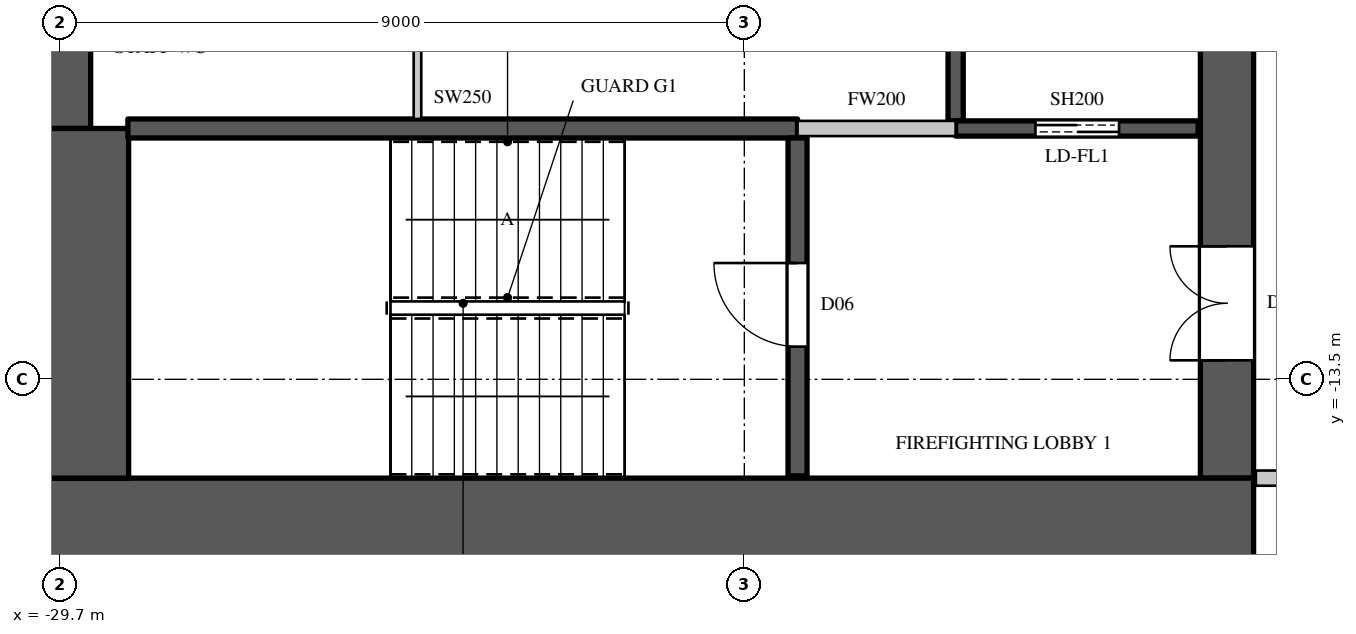
"""IFC4 building model, lengths in metres.
Left out: names, types, materials, properties, quantities, classifications, styles, units other than length and angle.
Written with IfcOpenShell. Run it as: python <this file> out.ifc"""

import sys

from ifc_helpers import new_model, si_unit, direction, frame, frame_2d, origin, place, context, subcontext, project, spatial, rectangle, extrude, element, fill, save


model = new_model("IFC4")
c1 = context("Model", 3, precision=1e-05, world=origin(), true_north=direction((0.0, 1.0)))
c2 = subcontext(c1, "Body", "Model", "MODEL_VIEW")
j1 = project(units=[si_unit("LENGTHUNIT", "METRE"), si_unit("PLANEANGLEUNIT", "RADIAN")], contexts=[c1])
p1 = place(None, origin())
s1 = spatial("IfcSite", under=j1, at=p1, CompositionType="ELEMENT")
p2 = place(p1, origin())
s2 = spatial("IfcBuilding", under=s1, at=p2, CompositionType="ELEMENT")
p3 = place(p2, frame((0.0, 0.0, 268.0)))
s3 = spatial("IfcBuildingStorey", under=s2, at=p3, CompositionType="ELEMENT", Elevation=268.0)
p4 = place(p3, frame((-30.0, -15.4, 0.0), z_axis=(0.0, 0.0, 1.0), x_axis=(1.0, 0.0, 0.0)))
e1 = element("IfcWall", 1, at=p4, inside=s3, PredefinedType="SHEAR", context=c2, shape_type="SweptSolid", body=[
    extrude(rectangle(XDim=16.0, YDim=1.2, at=frame_2d((8.0, 0.0))), origin(), (0.0, 0.0, 1.0), 4.1),
])
p5 = place(p3, frame((-14.35, -14.8, 0.0), z_axis=(0.0, 0.0, 1.0), x_axis=(0.0, 1.0, 0.0)))
e2 = element("IfcWall", 2, at=p5, inside=s3, PredefinedType="SHEAR", context=c2, shape_type="SweptSolid", body=[
    extrude(rectangle(XDim=29.6, YDim=0.7, at=frame_2d((14.8, 0.0))), origin(), (0.0, 0.0, 1.0), 4.1),
])
p6 = place(p5, frame((1.55, 0.0, 0.0)))
e3 = element("IfcOpeningElement", 3, at=p6, cuts=e2, PredefinedType="OPENING", context=c2, shape_type="SweptSolid", body=[
    extrude(rectangle(XDim=1.5, YDim=2.4, at=frame_2d((0.75, 1.2))), frame((0.0, 0.36, 0.0), z_axis=(0.0, -1.0, 0.0), x_axis=(1.0, 0.0, 0.0)), (0.0, 0.0, 1.0), 0.72),
])
p7 = place(p5, frame((26.55, 0.0, 0.0)))
e4 = element("IfcOpeningElement", 4, at=p7, cuts=e2, PredefinedType="OPENING", context=c2, shape_type="SweptSolid", body=[
    extrude(rectangle(XDim=1.5, YDim=2.4, at=frame_2d((0.75, 1.2))), frame((0.0, 0.36, 0.0), z_axis=(0.0, -1.0, 0.0), x_axis=(1.0, 0.0, 0.0)), (0.0, 0.0, 1.0), 0.72),
])
p8 = place(p5, frame((8.45, 0.0, 0.0)))
e5 = element("IfcOpeningElement", 5, at=p8, cuts=e2, PredefinedType="OPENING", context=c2, shape_type="SweptSolid", body=[
    extrude(rectangle(XDim=1.5, YDim=2.4, at=frame_2d((0.75, 1.2))), frame((0.0, 0.36, 0.0), z_axis=(0.0, -1.0, 0.0), x_axis=(1.0, 0.0, 0.0)), (0.0, 0.0, 1.0), 0.72),
])
p9 = place(p5, frame((19.65, 0.0, 0.0)))
e6 = element("IfcOpeningElement", 6, at=p9, cuts=e2, PredefinedType="OPENING", context=c2, shape_type="SweptSolid", body=[
    extrude(rectangle(XDim=1.5, YDim=2.4, at=frame_2d((0.75, 1.2))), frame((0.0, 0.36, 0.0), z_axis=(0.0, -1.0, 0.0), x_axis=(1.0, 0.0, 0.0)), (0.0, 0.0, 1.0), 0.72),
])
p10 = place(p5, frame((14.5, 0.0, 0.0)))
e7 = element("IfcOpeningElement", 7, at=p10, cuts=e2, PredefinedType="OPENING", context=c2, shape_type="SweptSolid", body=[
    extrude(rectangle(XDim=0.6, YDim=2.0, at=frame_2d((0.3, 1.0))), frame((0.0, 0.36, 0.0), z_axis=(0.0, -1.0, 0.0), x_axis=(1.0, 0.0, 0.0)), (0.0, 0.0, 1.0), 0.72),
])
p11 = place(p3, frame((-29.65, -10.2, 0.0), z_axis=(0.0, 0.0, 1.0), x_axis=(0.0, 1.0, 0.0)))
e8 = element("IfcWall", 8, at=p11, inside=s3, PredefinedType="SHEAR", context=c2, shape_type="SweptSolid", body=[
    extrude(rectangle(XDim=20.4, YDim=0.7, at=frame_2d((10.2, 0.0))), origin(), (0.0, 0.0, 1.0), 4.1),
])
p12 = place(p3, frame((-29.4, -14.8, 0.0), z_axis=(0.0, 0.0, 1.0), x_axis=(0.0, 1.0, 0.0)))
e9 = element("IfcWall", 9, at=p12, inside=s3, PredefinedType="SHEAR", context=c2, shape_type="SweptSolid", body=[
    extrude(rectangle(XDim=4.6, YDim=1.2, at=frame_2d((2.3, 0.0))), origin(), (0.0, 0.0, 1.0), 4.1),
])
p13 = place(p3, frame((-20.0, -10.2, 0.0), z_axis=(0.0, 0.0, 1.0), x_axis=(1.0, 0.0, 0.0)))
e10 = element("IfcWall", 10, at=p13, inside=s3, PredefinedType="PARTITIONING", context=c2, shape_type="SweptSolid", body=[
    extrude(rectangle(XDim=2.08, YDim=0.2, at=frame_2d((1.04, 0.0))), origin(), (0.0, 0.0, 1.0), 3.8),
])
p14 = place(p3, frame((-13.97, -14.8, 0.0), z_axis=(0.0, 0.0, 1.0), x_axis=(1.0, 0.0, 0.0)))
e11 = element("IfcWall", 11, at=p14, inside=s3, PredefinedType="PARTITIONING", context=c2, shape_type="SweptSolid", body=[
    extrude(rectangle(XDim=2.87, YDim=0.2, at=frame_2d((1.435, 0.0))), origin(), (0.0, 0.0, 1.0), 3.8),
])
p15 = place(p3, frame((-17.92, -10.1, 0.0), z_axis=(0.0, 0.0, 1.0), x_axis=(0.0, 1.0, 0.0)))
e12 = element("IfcWall", 12, at=p15, inside=s3, PredefinedType="SHEAR", context=c2, shape_type="SweptSolid", body=[
    extrude(rectangle(XDim=2.6, YDim=0.2, at=frame_2d((1.3, 0.0))), origin(), (0.0, 0.0, 1.0), 3.8),
])
p16 = place(p3, frame((-17.92, -10.2, 0.0), z_axis=(0.0, 0.0, 1.0), x_axis=(1.0, 0.0, 0.0)))
e13 = element("IfcWall", 13, at=p16, inside=s3, PredefinedType="SHEAR", context=c2, shape_type="SweptSolid", body=[
    extrude(rectangle(XDim=3.19, YDim=0.2, at=frame_2d((1.595, 0.0))), origin(), (0.0, 0.0, 1.0), 3.8),
])
p17 = place(p16, frame((1.05, 0.0, 0.0)))
e14 = element("IfcOpeningElement", 14, at=p17, cuts=e13, PredefinedType="OPENING", context=c2, shape_type="SweptSolid", body=[
    extrude(rectangle(XDim=1.1, YDim=2.2, at=frame_2d((0.55, 1.1))), frame((0.0, 0.11, 0.0), z_axis=(0.0, -1.0, 0.0), x_axis=(1.0, 0.0, 0.0)), (0.0, 0.0, 1.0), 0.22),
])
p18 = place(p3, frame((-28.81, -10.2, 0.0), z_axis=(0.0, 0.0, 1.0), x_axis=(1.0, 0.0, 0.0)))
e15 = element("IfcWall", 15, at=p18, inside=s3, PredefinedType="SHEAR", context=c2, shape_type="SweptSolid", body=[
    extrude(rectangle(XDim=8.81, YDim=0.25, at=frame_2d((4.405, 0.0))), origin(), (0.0, 0.0, 1.0), 3.8),
])
p19 = place(p3, frame((-20.0, -14.77, 0.0), z_axis=(0.0, 0.0, 1.0), x_axis=(0.0, 1.0, 0.0)))
e16 = element("IfcWall", 16, at=p19, inside=s3, PredefinedType="SHEAR", context=c2, shape_type="SweptSolid", body=[
    extrude(rectangle(XDim=4.445, YDim=0.25, at=frame_2d((2.223, 0.0))), origin(), (0.0, 0.0, 1.0), 3.8),
])
p20 = place(p19, frame((1.7, 0.0, 0.0)))
e17 = element("IfcOpeningElement", 17, at=p20, cuts=e16, PredefinedType="OPENING", context=c2, shape_type="SweptSolid", body=[
    extrude(rectangle(XDim=1.1, YDim=2.2, at=frame_2d((0.55, 1.1))), frame((0.0, 0.135, 0.0), z_axis=(0.0, -1.0, 0.0), x_axis=(1.0, 0.0, 0.0)), (0.0, 0.0, 1.0), 0.27),
])
p21 = place(p3, frame((-25.0, -10.075, 0.0), z_axis=(0.0, 0.0, 1.0), x_axis=(0.0, 1.0, 0.0)))
e18 = element("IfcWall", 18, at=p21, inside=s3, PredefinedType="PARTITIONING", context=c2, shape_type="SweptSolid", body=[
    extrude(rectangle(XDim=2.575, YDim=0.1, at=frame_2d((1.288, 0.0))), origin(), (0.0, 0.0, 1.0), 3.8),
])
p22 = place(p20, origin())
e19 = element("IfcDoor", 19, at=p22, inside=s3, OperationType="SINGLE_SWING_RIGHT", PredefinedType="DOOR", context=c2, shape_type="SweptSolid", body=[
    extrude(rectangle(XDim=1.1, YDim=2.2, at=frame_2d((0.55, 1.1))), frame((0.0, 0.025, 0.0), z_axis=(0.0, -1.0, 0.0), x_axis=(1.0, 0.0, 0.0)), (0.0, 0.0, 1.0), 0.05),
])
fill(e17, e19)
p23 = place(p17, origin())
e20 = element("IfcDoor", 20, at=p23, inside=s3, OperationType="DOUBLE_DOOR_SLIDING", PredefinedType="DOOR", context=c2, shape_type="SweptSolid", body=[
    extrude(rectangle(XDim=1.1, YDim=2.2, at=frame_2d((0.55, 1.1))), frame((0.0, 0.025, 0.0), z_axis=(0.0, -1.0, 0.0), x_axis=(1.0, 0.0, 0.0)), (0.0, 0.0, 1.0), 0.05),
])
fill(e14, e20)
p24 = place(p6, origin())
e21 = element("IfcDoor", 21, at=p24, inside=s3, OperationType="DOUBLE_DOOR_SINGLE_SWING", PredefinedType="DOOR", context=c2, shape_type="SweptSolid", body=[
    extrude(rectangle(XDim=1.5, YDim=2.4, at=frame_2d((0.75, 1.2))), frame((0.0, 0.345, 0.0), z_axis=(0.0, -1.0, 0.0), x_axis=(1.0, 0.0, 0.0)), (0.0, 0.0, 1.0), 0.05),
])
fill(e3, e21)
save(model, sys.argv[1])
